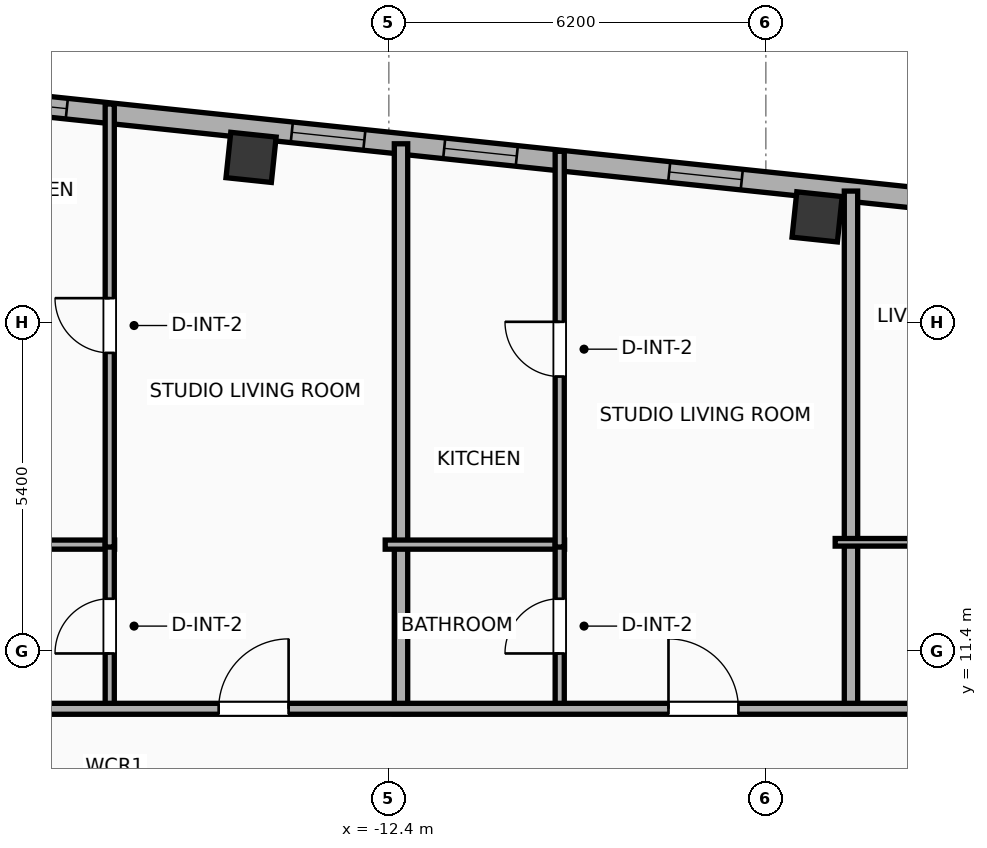
"""IFC4 building model, lengths in metres.
Left out: names, types, materials, properties, quantities, classifications, styles, units other than length and angle.
Written with IfcOpenShell. Run it as: python <this file> out.ifc"""

import sys

from ifc_helpers import new_model, si_unit, direction, frame, frame_2d, origin, origin_2d, place, context, subcontext, project, spatial, rectangle, hollow_rectangle, extrude, element, fill, save


model = new_model("IFC4")
c1 = context("Model", 3, precision=1e-05, world=origin(), true_north=direction((0.0, 1.0)))
c2 = subcontext(c1, "Body", "Model", "MODEL_VIEW")
j1 = project(units=[si_unit("LENGTHUNIT", "METRE"), si_unit("PLANEANGLEUNIT", "RADIAN")], contexts=[c1])
p1 = place(None, origin())
s1 = spatial("IfcSite", under=j1, at=p1, CompositionType="ELEMENT")
p2 = place(p1, origin())
s2 = spatial("IfcBuilding", under=s1, at=p2, CompositionType="ELEMENT")
p3 = place(p2, frame((0.0, 0.0, 306.8)))
s3 = spatial("IfcBuildingStorey", under=s2, at=p3, CompositionType="ELEMENT", Elevation=306.8)
for number, where, z_axis, x_axis in (
    (1, (-5.357, 18.54, 0.0), (0.0, 0.0, 1.0), (0.995, -0.105, 0.0)),
    (2, (-14.666, 19.518, 0.0), (0.0, 0.0, 1.0), (0.995, -0.105, 0.0)),
):
    element("IfcColumn", number, at=place(p3, frame(where, z_axis=z_axis, x_axis=x_axis)), inside=s3, PredefinedType="COLUMN", context=c2, shape_type="SweptSolid", body=[
        extrude(hollow_rectangle(XDim=0.75, YDim=0.75, WallThickness=0.025, at=origin_2d()), origin(), (0.0, 0.0, 1.0), 3.865),
    ])
p4 = place(p3, frame((-23.908, 20.972, 0.0), z_axis=(0.0, 0.0, 1.0), x_axis=(0.994521888554, -0.104528528102, 0.0)))
e3 = element("IfcWall", 3, at=p4, inside=s3, PredefinedType="ELEMENTEDWALL", context=c2, shape_type="SweptSolid", body=[
    extrude(rectangle(XDim=46.766, YDim=0.34, at=frame_2d((23.383, 0.0))), origin(), (0.0, 0.0, 1.0), 2.39),
])
p5 = place(p4, frame((23.733, 0.0, 0.65)))
e4 = element("IfcOpeningElement", 4, at=p5, cuts=e3, PredefinedType="OPENING", context=c2, shape_type="SweptSolid", body=[
    extrude(rectangle(XDim=2.6, YDim=1.45, at=frame_2d((1.3, 0.725))), frame((0.0, 0.18, 0.0), z_axis=(0.0, -1.0, 0.0), x_axis=(1.0, 0.0, 0.0)), (0.0, 0.0, 1.0), 0.36),
])
p6 = place(p4, frame((38.522, 0.0, 0.65)))
e5 = element("IfcOpeningElement", 5, at=p6, cuts=e3, PredefinedType="OPENING", context=c2, shape_type="SweptSolid", body=[
    extrude(rectangle(XDim=2.6, YDim=1.45, at=frame_2d((1.3, 0.725))), frame((0.0, 0.18, 0.0), z_axis=(0.0, -1.0, 0.0), x_axis=(1.0, 0.0, 0.0)), (0.0, 0.0, 1.0), 0.36),
])
p7 = place(p4, frame((2.019, 0.0, 0.55)))
e6 = element("IfcOpeningElement", 6, at=p7, cuts=e3, PredefinedType="OPENING", context=c2, shape_type="SweptSolid", body=[
    extrude(rectangle(XDim=1.2, YDim=1.15, at=frame_2d((0.6, 0.575))), frame((0.0, 0.18, 0.0), z_axis=(0.0, -1.0, 0.0), x_axis=(1.0, 0.0, 0.0)), (0.0, 0.0, 1.0), 0.36),
])
p8 = place(p4, frame((9.966, 0.0, 0.55)))
e7 = element("IfcOpeningElement", 7, at=p8, cuts=e3, PredefinedType="OPENING", context=c2, shape_type="SweptSolid", body=[
    extrude(rectangle(XDim=1.2, YDim=1.15, at=frame_2d((0.6, 0.575))), frame((0.0, 0.18, 0.0), z_axis=(0.0, -1.0, 0.0), x_axis=(1.0, 0.0, 0.0)), (0.0, 0.0, 1.0), 0.36),
])
p9 = place(p4, frame((5.046, 0.0, 0.55)))
e8 = element("IfcOpeningElement", 8, at=p9, cuts=e3, PredefinedType="OPENING", context=c2, shape_type="SweptSolid", body=[
    extrude(rectangle(XDim=1.2, YDim=1.15, at=frame_2d((0.6, 0.575))), frame((0.0, 0.18, 0.0), z_axis=(0.0, -1.0, 0.0), x_axis=(1.0, 0.0, 0.0)), (0.0, 0.0, 1.0), 0.36),
])
p10 = place(p4, frame((16.207, 0.0, 0.55)))
e9 = element("IfcOpeningElement", 9, at=p10, cuts=e3, PredefinedType="OPENING", context=c2, shape_type="SweptSolid", body=[
    extrude(rectangle(XDim=1.2, YDim=1.15, at=frame_2d((0.6, 0.575))), frame((0.0, 0.18, 0.0), z_axis=(0.0, -1.0, 0.0), x_axis=(1.0, 0.0, 0.0)), (0.0, 0.0, 1.0), 0.36),
])
p11 = place(p4, frame((12.487, 0.0, 0.55)))
e10 = element("IfcOpeningElement", 10, at=p11, cuts=e3, PredefinedType="OPENING", context=c2, shape_type="SweptSolid", body=[
    extrude(rectangle(XDim=1.2, YDim=1.15, at=frame_2d((0.6, 0.575))), frame((0.0, 0.18, 0.0), z_axis=(0.0, -1.0, 0.0), x_axis=(1.0, 0.0, 0.0)), (0.0, 0.0, 1.0), 0.36),
])
p12 = place(p4, frame((20.621, 0.0, 0.55)))
e11 = element("IfcOpeningElement", 11, at=p12, cuts=e3, PredefinedType="OPENING", context=c2, shape_type="SweptSolid", body=[
    extrude(rectangle(XDim=1.2, YDim=1.15, at=frame_2d((0.6, 0.575))), frame((0.0, 0.18, 0.0), z_axis=(0.0, -1.0, 0.0), x_axis=(1.0, 0.0, 0.0)), (0.0, 0.0, 1.0), 0.36),
])
p13 = place(p4, frame((28.704, 0.0, 0.55)))
e12 = element("IfcOpeningElement", 12, at=p13, cuts=e3, PredefinedType="OPENING", context=c2, shape_type="SweptSolid", body=[
    extrude(rectangle(XDim=1.2, YDim=1.15, at=frame_2d((0.6, 0.575))), frame((0.0, 0.18, 0.0), z_axis=(0.0, -1.0, 0.0), x_axis=(1.0, 0.0, 0.0)), (0.0, 0.0, 1.0), 0.36),
])
p14 = place(p4, frame((32.185, 0.0, 0.55)))
e13 = element("IfcOpeningElement", 13, at=p14, cuts=e3, PredefinedType="OPENING", context=c2, shape_type="SweptSolid", body=[
    extrude(rectangle(XDim=1.2, YDim=1.15, at=frame_2d((0.6, 0.575))), frame((0.0, 0.18, 0.0), z_axis=(0.0, -1.0, 0.0), x_axis=(1.0, 0.0, 0.0)), (0.0, 0.0, 1.0), 0.36),
])
p15 = place(p4, frame((35.503, 0.0, 0.55)))
e14 = element("IfcOpeningElement", 14, at=p15, cuts=e3, PredefinedType="OPENING", context=c2, shape_type="SweptSolid", body=[
    extrude(rectangle(XDim=1.2, YDim=1.15, at=frame_2d((0.6, 0.575))), frame((0.0, 0.18, 0.0), z_axis=(0.0, -1.0, 0.0), x_axis=(1.0, 0.0, 0.0)), (0.0, 0.0, 1.0), 0.36),
])
p16 = place(p4, frame((43.106, 0.0, 0.55)))
e15 = element("IfcOpeningElement", 15, at=p16, cuts=e3, PredefinedType="OPENING", context=c2, shape_type="SweptSolid", body=[
    extrude(rectangle(XDim=1.2, YDim=1.15, at=frame_2d((0.6, 0.575))), frame((0.0, 0.18, 0.0), z_axis=(0.0, -1.0, 0.0), x_axis=(1.0, 0.0, 0.0)), (0.0, 0.0, 1.0), 0.36),
])
p17 = place(p3, frame((-19.86, 13.15, 0.0), z_axis=(0.0, 0.0, 1.0), x_axis=(1.0, 0.0, 0.0)))
e16 = element("IfcWall", 16, at=p17, inside=s3, PredefinedType="PLUMBINGWALL", context=c2, shape_type="SweptSolid", body=[
    extrude(rectangle(XDim=2.95, YDim=0.15, at=frame_2d((1.475, 0.0))), origin(), (0.0, 0.0, 1.0), 3.5),
])
p18 = place(p3, frame((-16.99, 10.43, 0.0), z_axis=(0.0, 0.0, 1.0), x_axis=(0.0, 1.0, 0.0)))
e17 = element("IfcWall", 17, at=p18, inside=s3, PredefinedType="PLUMBINGWALL", context=c2, shape_type="SweptSolid", body=[
    extrude(rectangle(XDim=2.76, YDim=0.15, at=frame_2d((1.38, 0.0))), origin(), (0.0, 0.0, 1.0), 3.5),
])
p19 = place(p18, frame((0.93, 0.0, 0.0)))
e18 = element("IfcOpeningElement", 18, at=p19, cuts=e17, PredefinedType="OPENING", context=c2, shape_type="SweptSolid", body=[
    extrude(rectangle(XDim=0.9, YDim=2.05, at=frame_2d((0.45, 1.025))), frame((0.0, 0.085, 0.0), z_axis=(0.0, -1.0, 0.0), x_axis=(1.0, 0.0, 0.0)), (0.0, 0.0, 1.0), 0.17),
])
p20 = place(p3, frame((-16.99, 13.11, 0.0), z_axis=(0.0, 0.0, 1.0), x_axis=(0.0, 1.0, 0.0)))
e19 = element("IfcWall", 19, at=p20, inside=s3, PredefinedType="PLUMBINGWALL", context=c2, shape_type="SweptSolid", body=[
    extrude(rectangle(XDim=7.286, YDim=0.15, at=frame_2d((3.643, 0.0))), origin(), (0.0, 0.0, 1.0), 3.5),
])
p21 = place(p20, frame((3.193, 0.0, 0.0)))
e20 = element("IfcOpeningElement", 20, at=p21, cuts=e19, PredefinedType="OPENING", context=c2, shape_type="SweptSolid", body=[
    extrude(rectangle(XDim=0.9, YDim=2.05, at=frame_2d((0.45, 1.025))), frame((0.0, 0.085, 0.0), z_axis=(0.0, -1.0, 0.0), x_axis=(1.0, 0.0, 0.0)), (0.0, 0.0, 1.0), 0.17),
])
p22 = place(p3, frame((-12.2, 10.37, 0.0), z_axis=(0.0, 0.0, 1.0), x_axis=(0.0, 1.0, 0.0)))
e21 = element("IfcWall", 21, at=p22, inside=s3, PredefinedType="PARTITIONING", context=c2, shape_type="SweptSolid", body=[
    extrude(rectangle(XDim=9.372, YDim=0.22, at=frame_2d((4.686, 0.0))), origin(), (0.0, 0.0, 1.0), 3.5),
])
p23 = place(p3, frame((-12.46, 13.15, 0.0), z_axis=(0.0, 0.0, 1.0), x_axis=(1.0, 0.0, 0.0)))
e22 = element("IfcWall", 22, at=p23, inside=s3, PredefinedType="PLUMBINGWALL", context=c2, shape_type="SweptSolid", body=[
    extrude(rectangle(XDim=2.95, YDim=0.15, at=frame_2d((1.475, 0.0))), origin(), (0.0, 0.0, 1.0), 3.5),
])
p24 = place(p3, frame((-9.59, 10.43, 0.0), z_axis=(0.0, 0.0, 1.0), x_axis=(0.0, 1.0, 0.0)))
e23 = element("IfcWall", 23, at=p24, inside=s3, PredefinedType="PLUMBINGWALL", context=c2, shape_type="SweptSolid", body=[
    extrude(rectangle(XDim=2.76, YDim=0.15, at=frame_2d((1.38, 0.0))), origin(), (0.0, 0.0, 1.0), 3.5),
])
p25 = place(p24, frame((0.93, 0.0, 0.0)))
e24 = element("IfcOpeningElement", 24, at=p25, cuts=e23, PredefinedType="OPENING", context=c2, shape_type="SweptSolid", body=[
    extrude(rectangle(XDim=0.9, YDim=2.05, at=frame_2d((0.45, 1.025))), frame((0.0, 0.085, 0.0), z_axis=(0.0, -1.0, 0.0), x_axis=(1.0, 0.0, 0.0)), (0.0, 0.0, 1.0), 0.17),
])
p26 = place(p3, frame((-9.59, 13.11, 0.0), z_axis=(0.0, 0.0, 1.0), x_axis=(0.0, 1.0, 0.0)))
e25 = element("IfcWall", 25, at=p26, inside=s3, PredefinedType="PLUMBINGWALL", context=c2, shape_type="SweptSolid", body=[
    extrude(rectangle(XDim=6.508, YDim=0.15, at=frame_2d((3.254, 0.0))), origin(), (0.0, 0.0, 1.0), 3.5),
])
p27 = place(p26, frame((2.804, 0.0, 0.0)))
e26 = element("IfcOpeningElement", 26, at=p27, cuts=e25, PredefinedType="OPENING", context=c2, shape_type="SweptSolid", body=[
    extrude(rectangle(XDim=0.9, YDim=2.05, at=frame_2d((0.45, 1.025))), frame((0.0, 0.085, 0.0), z_axis=(0.0, -1.0, 0.0), x_axis=(1.0, 0.0, 0.0)), (0.0, 0.0, 1.0), 0.17),
])
p28 = place(p3, frame((-4.8, 10.37, 0.0), z_axis=(0.0, 0.0, 1.0), x_axis=(0.0, 1.0, 0.0)))
e27 = element("IfcWall", 27, at=p28, inside=s3, PredefinedType="PARTITIONING", context=c2, shape_type="SweptSolid", body=[
    extrude(rectangle(XDim=8.594, YDim=0.22, at=frame_2d((4.297, 0.0))), origin(), (0.0, 0.0, 1.0), 2.39),
])
p29 = place(p3, frame((-5.06, 13.188, 0.0), z_axis=(0.0, 0.0, 1.0), x_axis=(1.0, 0.0, 0.0)))
e28 = element("IfcWall", 28, at=p29, inside=s3, PredefinedType="PARTITIONING", context=c2, shape_type="SweptSolid", body=[
    extrude(rectangle(XDim=2.69, YDim=0.125, at=frame_2d((1.345, 0.0))), origin(), (0.0, 0.0, 1.0), 3.5),
])
p30 = place(p3, frame((-28.479, 10.45, 0.0), z_axis=(0.0, 0.0, 1.0), x_axis=(1.0, 0.0, 0.0)))
e29 = element("IfcWall", 29, at=p30, inside=s3, PredefinedType="PARTITIONING", context=c2, shape_type="SweptSolid", body=[
    extrude(rectangle(XDim=53.956, YDim=0.18, at=frame_2d((26.978, 0.0))), origin(), (0.0, 0.0, 1.0), 3.5),
])
p31 = place(p30, frame((4.065, 0.0, 0.0)))
e30 = element("IfcOpeningElement", 30, at=p31, cuts=e29, PredefinedType="OPENING", context=c2, shape_type="SweptSolid", body=[
    extrude(rectangle(XDim=1.15, YDim=2.05, at=frame_2d((0.575, 1.025))), frame((0.0, 0.1, 0.0), z_axis=(0.0, -1.0, 0.0), x_axis=(1.0, 0.0, 0.0)), (0.0, 0.0, 1.0), 0.2),
])
p32 = place(p30, frame((13.281, 0.0, 0.0)))
e31 = element("IfcOpeningElement", 31, at=p32, cuts=e29, PredefinedType="OPENING", context=c2, shape_type="SweptSolid", body=[
    extrude(rectangle(XDim=1.15, YDim=2.05, at=frame_2d((0.575, 1.025))), frame((0.0, 0.1, 0.0), z_axis=(0.0, -1.0, 0.0), x_axis=(1.0, 0.0, 0.0)), (0.0, 0.0, 1.0), 0.2),
])
p33 = place(p30, frame((20.678, 0.0, 0.0)))
e32 = element("IfcOpeningElement", 32, at=p33, cuts=e29, PredefinedType="OPENING", context=c2, shape_type="SweptSolid", body=[
    extrude(rectangle(XDim=1.15, YDim=2.05, at=frame_2d((0.575, 1.025))), frame((0.0, 0.1, 0.0), z_axis=(0.0, -1.0, 0.0), x_axis=(1.0, 0.0, 0.0)), (0.0, 0.0, 1.0), 0.2),
])
p34 = place(p30, frame((26.969, 0.0, 0.0)))
e33 = element("IfcOpeningElement", 33, at=p34, cuts=e29, PredefinedType="OPENING", context=c2, shape_type="SweptSolid", body=[
    extrude(rectangle(XDim=1.15, YDim=2.05, at=frame_2d((0.575, 1.025))), frame((0.0, 0.1, 0.0), z_axis=(0.0, -1.0, 0.0), x_axis=(1.0, 0.0, 0.0)), (0.0, 0.0, 1.0), 0.2),
])
p35 = place(p30, frame((32.931, 0.0, 0.0)))
e34 = element("IfcOpeningElement", 34, at=p35, cuts=e29, PredefinedType="OPENING", context=c2, shape_type="SweptSolid", body=[
    extrude(rectangle(XDim=1.15, YDim=2.05, at=frame_2d((0.575, 1.025))), frame((0.0, 0.1, 0.0), z_axis=(0.0, -1.0, 0.0), x_axis=(1.0, 0.0, 0.0)), (0.0, 0.0, 1.0), 0.2),
])
p36 = place(p30, frame((41.769, 0.0, 0.0)))
e35 = element("IfcOpeningElement", 35, at=p36, cuts=e29, PredefinedType="OPENING", context=c2, shape_type="SweptSolid", body=[
    extrude(rectangle(XDim=1.15, YDim=2.05, at=frame_2d((0.575, 1.025))), frame((0.0, 0.1, 0.0), z_axis=(0.0, -1.0, 0.0), x_axis=(1.0, 0.0, 0.0)), (0.0, 0.0, 1.0), 0.2),
])
p37 = place(p30, frame((49.761, 0.0, 0.0)))
e36 = element("IfcOpeningElement", 36, at=p37, cuts=e29, PredefinedType="OPENING", context=c2, shape_type="SweptSolid", body=[
    extrude(rectangle(XDim=0.9, YDim=2.05, at=frame_2d((0.45, 1.025))), frame((0.0, 0.1, 0.0), z_axis=(0.0, -1.0, 0.0), x_axis=(1.0, 0.0, 0.0)), (0.0, 0.0, 1.0), 0.2),
])
p38 = place(p8, origin())
e37 = element("IfcWindow", 37, at=p38, inside=s3, PartitioningType="SINGLE_PANEL", PredefinedType="WINDOW", context=c2, shape_type="SweptSolid", body=[
    extrude(rectangle(XDim=1.2, YDim=1.15, at=frame_2d((0.6, 0.575))), frame((0.0, 0.03, 0.0), z_axis=(0.0, -1.0, 0.0), x_axis=(1.0, 0.0, 0.0)), (0.0, 0.0, 1.0), 0.06),
])
fill(e7, e37)
p39 = place(p9, origin())
e38 = element("IfcWindow", 38, at=p39, inside=s3, PartitioningType="SINGLE_PANEL", PredefinedType="WINDOW", context=c2, shape_type="SweptSolid", body=[
    extrude(rectangle(XDim=1.2, YDim=1.15, at=frame_2d((0.6, 0.575))), frame((0.0, 0.03, 0.0), z_axis=(0.0, -1.0, 0.0), x_axis=(1.0, 0.0, 0.0)), (0.0, 0.0, 1.0), 0.06),
])
fill(e8, e38)
p40 = place(p10, origin())
e39 = element("IfcWindow", 39, at=p40, inside=s3, PartitioningType="SINGLE_PANEL", PredefinedType="WINDOW", context=c2, shape_type="SweptSolid", body=[
    extrude(rectangle(XDim=1.2, YDim=1.15, at=frame_2d((0.6, 0.575))), frame((0.0, 0.03, 0.0), z_axis=(0.0, -1.0, 0.0), x_axis=(1.0, 0.0, 0.0)), (0.0, 0.0, 1.0), 0.06),
])
fill(e9, e39)
p41 = place(p11, origin())
e40 = element("IfcWindow", 40, at=p41, inside=s3, PartitioningType="SINGLE_PANEL", PredefinedType="WINDOW", context=c2, shape_type="SweptSolid", body=[
    extrude(rectangle(XDim=1.2, YDim=1.15, at=frame_2d((0.6, 0.575))), frame((0.0, 0.03, 0.0), z_axis=(0.0, -1.0, 0.0), x_axis=(1.0, 0.0, 0.0)), (0.0, 0.0, 1.0), 0.06),
])
fill(e10, e40)
p42 = place(p19, origin())
e41 = element("IfcDoor", 41, at=p42, inside=s3, OperationType="SINGLE_SWING_LEFT", PredefinedType="DOOR", context=c2, shape_type="SweptSolid", body=[
    extrude(rectangle(XDim=0.9, YDim=2.05, at=frame_2d((0.45, 1.025))), frame((0.0, 0.025, 0.0), z_axis=(0.0, -1.0, 0.0), x_axis=(1.0, 0.0, 0.0)), (0.0, 0.0, 1.0), 0.05),
])
fill(e18, e41)
p43 = place(p21, origin())
e42 = element("IfcDoor", 42, at=p43, inside=s3, OperationType="SINGLE_SWING_RIGHT", PredefinedType="DOOR", context=c2, shape_type="SweptSolid", body=[
    extrude(rectangle(XDim=0.9, YDim=2.05, at=frame_2d((0.45, 1.025))), frame((0.0, 0.025, 0.0), z_axis=(0.0, -1.0, 0.0), x_axis=(1.0, 0.0, 0.0)), (0.0, 0.0, 1.0), 0.05),
])
fill(e20, e42)
p44 = place(p25, origin())
e43 = element("IfcDoor", 43, at=p44, inside=s3, OperationType="SINGLE_SWING_LEFT", PredefinedType="DOOR", context=c2, shape_type="SweptSolid", body=[
    extrude(rectangle(XDim=0.9, YDim=2.05, at=frame_2d((0.45, 1.025))), frame((0.0, 0.025, 0.0), z_axis=(0.0, -1.0, 0.0), x_axis=(1.0, 0.0, 0.0)), (0.0, 0.0, 1.0), 0.05),
])
fill(e24, e43)
p45 = place(p27, origin())
e44 = element("IfcDoor", 44, at=p45, inside=s3, OperationType="SINGLE_SWING_RIGHT", PredefinedType="DOOR", context=c2, shape_type="SweptSolid", body=[
    extrude(rectangle(XDim=0.9, YDim=2.05, at=frame_2d((0.45, 1.025))), frame((0.0, 0.025, 0.0), z_axis=(0.0, -1.0, 0.0), x_axis=(1.0, 0.0, 0.0)), (0.0, 0.0, 1.0), 0.05),
])
fill(e26, e44)
p46 = place(p32, origin())
e45 = element("IfcDoor", 45, at=p46, inside=s3, OperationType="SINGLE_SWING_RIGHT", PredefinedType="DOOR", context=c2, shape_type="SweptSolid", body=[
    extrude(rectangle(XDim=1.15, YDim=2.05, at=frame_2d((0.575, 1.025))), frame((0.0, 0.025, 0.0), z_axis=(0.0, -1.0, 0.0), x_axis=(1.0, 0.0, 0.0)), (0.0, 0.0, 1.0), 0.05),
])
fill(e31, e45)
p47 = place(p33, origin())
e46 = element("IfcDoor", 46, at=p47, inside=s3, OperationType="SINGLE_SWING_LEFT", PredefinedType="DOOR", context=c2, shape_type="SweptSolid", body=[
    extrude(rectangle(XDim=1.15, YDim=2.05, at=frame_2d((0.575, 1.025))), frame((0.0, 0.025, 0.0), z_axis=(0.0, -1.0, 0.0), x_axis=(1.0, 0.0, 0.0)), (0.0, 0.0, 1.0), 0.05),
])
fill(e32, e46)
save(model, sys.argv[1])
